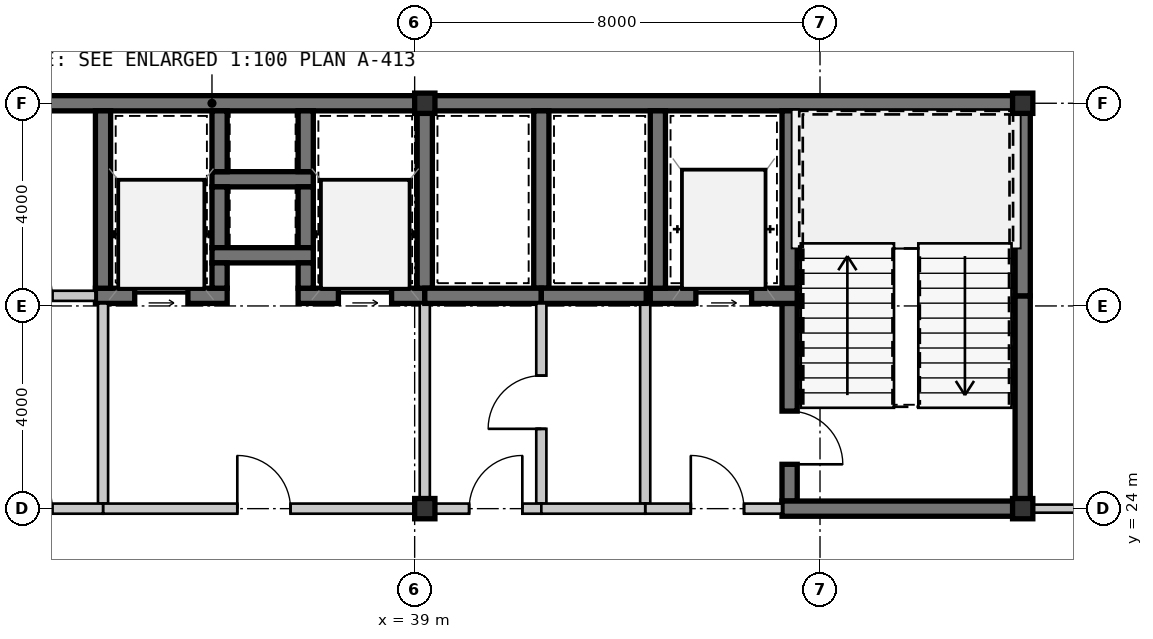
"""IFC4 building model, lengths in metres.
Left out: names, types, materials, properties, quantities, classifications, styles, units other than length and angle.
Written with IfcOpenShell. Run it as: python <this file> out.ifc"""

import sys

from ifc_helpers import new_model, si_unit, direction, frame, frame_2d, origin, origin_2d, place, context, subcontext, project, spatial, rectangle, hollow_rectangle, extrude, source, transform, mapped, element, fill, save


model = new_model("IFC4")
c1 = context("Model", 3, precision=1e-05, world=origin(), true_north=direction((0.0, 1.0)))
c2 = subcontext(c1, "Body", "Model", "MODEL_VIEW")
j1 = project(units=[si_unit("LENGTHUNIT", "METRE"), si_unit("PLANEANGLEUNIT", "RADIAN")], contexts=[c1])
p1 = place(None, origin())
s1 = spatial("IfcSite", under=j1, at=p1, CompositionType="ELEMENT")
p2 = place(p1, origin())
s2 = spatial("IfcBuilding", under=s1, at=p2, CompositionType="ELEMENT")
p3 = place(p2, frame((0.0, 0.0, 158.2)))
s3 = spatial("IfcBuildingStorey", under=s2, at=p3, CompositionType="ELEMENT", Elevation=158.2)
m1 = source(origin(), c2, "Body", "SweptSolid", [
    extrude(hollow_rectangle(XDim=0.4, YDim=0.4, WallThickness=0.016, at=origin_2d()), origin(), (0.0, 0.0, 1.0), 3.15),
])
for number, where, z_axis, x_axis in (
    (1, (39.2, 24.0, 0.0), (0.0, 0.0, 1.0), (1.0, 0.0, 0.0)),
    (2, (51.0, 24.0, 0.0), (0.0, 0.0, 1.0), (1.0, 0.0, 0.0)),
    (3, (39.2, 32.0, 0.0), (0.0, 0.0, 1.0), (1.0, 0.0, 0.0)),
    (4, (51.0, 32.0, 0.0), (0.0, 0.0, 1.0), (1.0, 0.0, 0.0)),
):
    element("IfcColumn", number, at=place(p3, frame(where, z_axis=z_axis, x_axis=x_axis)), inside=s3, PredefinedType="COLUMN", context=c2, shape_type="MappedRepresentation", body=[
        mapped(m1, transform((0.0, 0.0, 0.0), scale=1.0)),
    ])
m2 = source(origin(), c2, "Body", "SweptSolid", [
    extrude(rectangle(XDim=11.2, YDim=0.3, at=frame_2d((5.6, 0.0))), origin(), (0.0, 0.0, 1.0), 2.93),
])
p4 = place(p3, frame((28.0, 32.0, 0.0), z_axis=(0.0, 0.0, 1.0), x_axis=(1.0, 0.0, 0.0)))
e5 = element("IfcWall", 5, at=p4, inside=s3, PredefinedType="SHEAR", context=c2, shape_type="MappedRepresentation", body=[
    mapped(m2, transform((0.0, 0.0, 0.0), scale=1.0)),
])
m3 = source(origin(), c2, "Body", "SweptSolid", [
    extrude(rectangle(XDim=11.95, YDim=0.3, at=frame_2d((5.975, 0.0))), origin(), (0.0, 0.0, 1.0), 2.93),
])
p5 = place(p3, frame((39.2, 32.0, 0.0), z_axis=(0.0, 0.0, 1.0), x_axis=(1.0, 0.0, 0.0)))
e6 = element("IfcWall", 6, at=p5, inside=s3, PredefinedType="SHEAR", context=c2, shape_type="MappedRepresentation", body=[
    mapped(m3, transform((0.0, 0.0, 0.0), scale=1.0)),
])
m4 = source(origin(), c2, "Body", "SweptSolid", [
    extrude(rectangle(XDim=4.05, YDim=0.3, at=frame_2d((2.025, 0.0))), origin(), (0.0, 0.0, 1.0), 2.93),
])
p6 = place(p3, frame((51.0, 24.15, 0.0), z_axis=(0.0, 0.0, 1.0), x_axis=(0.0, 1.0, 0.0)))
e7 = element("IfcWall", 7, at=p6, inside=s3, PredefinedType="SHEAR", context=c2, shape_type="MappedRepresentation", body=[
    mapped(m4, transform((0.0, 0.0, 0.0), scale=1.0)),
])
m5 = source(origin(), c2, "Body", "SweptSolid", [
    extrude(rectangle(XDim=3.65, YDim=0.3, at=frame_2d((1.825, 0.0))), origin(), (0.0, 0.0, 1.0), 2.93),
])
p7 = place(p3, frame((51.0, 28.2, 0.0), z_axis=(0.0, 0.0, 1.0), x_axis=(0.0, 1.0, 0.0)))
e8 = element("IfcWall", 8, at=p7, inside=s3, PredefinedType="SHEAR", context=c2, shape_type="MappedRepresentation", body=[
    mapped(m5, transform((0.0, 0.0, 0.0), scale=1.0)),
])
m6 = source(origin(), c2, "Body", "SweptSolid", [
    extrude(rectangle(XDim=3.5, YDim=0.3, at=frame_2d((1.75, 0.0))), origin(), (0.0, 0.0, 1.0), 2.93),
])
p8 = place(p3, frame((46.4, 31.85, 0.0), z_axis=(0.0, 0.0, 1.0), x_axis=(0.0, -1.0, 0.0)))
e9 = element("IfcWall", 9, at=p8, inside=s3, PredefinedType="SHEAR", context=c2, shape_type="MappedRepresentation", body=[
    mapped(m6, transform((0.0, 0.0, 0.0), scale=1.0)),
])
m7 = source(origin(), c2, "Body", "SweptSolid", [
    extrude(rectangle(XDim=3.9, YDim=0.3, at=frame_2d((1.95, 0.0))), origin(), (0.0, 0.0, 1.0), 2.93),
])
p9 = place(p3, frame((46.4, 28.05, 0.0), z_axis=(0.0, 0.0, 1.0), x_axis=(0.0, -1.0, 0.0)))
e10 = element("IfcWall", 10, at=p9, inside=s3, PredefinedType="SHEAR", context=c2, shape_type="MappedRepresentation", body=[
    mapped(m7, transform((0.0, 0.0, 0.0), scale=1.0)),
])
m8 = source(origin(), c2, "Body", "SweptSolid", [
    extrude(rectangle(XDim=1.05, YDim=2.1, at=frame_2d((0.525, 1.05))), frame((0.0, 0.16, 0.0), z_axis=(0.0, -1.0, 0.0), x_axis=(1.0, 0.0, 0.0)), (0.0, 0.0, 1.0), 0.32),
])
p10 = place(p9, frame((2.125, 0.0, 0.0)))
e11 = element("IfcOpeningElement", 11, at=p10, cuts=e10, PredefinedType="OPENING", context=c2, shape_type="MappedRepresentation", body=[
    mapped(m8, transform((0.0, 0.0, 0.0), scale=1.0)),
])
m9 = source(origin(), c2, "Body", "SweptSolid", [
    extrude(rectangle(XDim=4.9, YDim=0.3, at=frame_2d((2.45, 0.0))), origin(), (0.0, 0.0, 1.0), 2.93),
])
p11 = place(p3, frame((46.25, 24.0, 0.0), z_axis=(0.0, 0.0, 1.0), x_axis=(1.0, 0.0, 0.0)))
e12 = element("IfcWall", 12, at=p11, inside=s3, PredefinedType="SHEAR", context=c2, shape_type="MappedRepresentation", body=[
    mapped(m9, transform((0.0, 0.0, 0.0), scale=1.0)),
])
m10 = source(origin(), c2, "Body", "SweptSolid", [
    extrude(rectangle(XDim=2.9, YDim=0.3, at=frame_2d((1.45, 0.0))), origin(), (0.0, 0.0, 1.0), 2.93),
])
p12 = place(p3, frame((43.65, 28.2, 0.0), z_axis=(0.0, 0.0, 1.0), x_axis=(1.0, 0.0, 0.0)))
e13 = element("IfcWall", 13, at=p12, inside=s3, PredefinedType="SHEAR", context=c2, shape_type="MappedRepresentation", body=[
    mapped(m10, transform((0.0, 0.0, 0.0), scale=1.0)),
])
m11 = source(origin(), c2, "Body", "SweptSolid", [
    extrude(rectangle(XDim=1.1, YDim=2.15, at=frame_2d((0.55, 1.075))), frame((0.0, 0.16, 0.0), z_axis=(0.0, -1.0, 0.0), x_axis=(1.0, 0.0, 0.0)), (0.0, 0.0, 1.0), 0.32),
])
p13 = place(p12, frame((0.9, 0.0, 0.0)))
e14 = element("IfcOpeningElement", 14, at=p13, cuts=e13, PredefinedType="OPENING", context=c2, shape_type="MappedRepresentation", body=[
    mapped(m11, transform((0.0, 0.0, 0.0), scale=1.0)),
])
p14 = place(p3, frame((43.8, 31.85, 0.0), z_axis=(0.0, 0.0, 1.0), x_axis=(0.0, -1.0, 0.0)))
e15 = element("IfcWall", 15, at=p14, inside=s3, PredefinedType="SHEAR", context=c2, shape_type="MappedRepresentation", body=[
    mapped(m6, transform((0.0, 0.0, 0.0), scale=1.0)),
])
m12 = source(origin(), c2, "Body", "SweptSolid", [
    extrude(rectangle(XDim=3.95, YDim=0.2, at=frame_2d((1.975, 0.0))), origin(), (0.0, 0.0, 1.0), 2.93),
])
p15 = place(p3, frame((43.55, 28.05, 0.0), z_axis=(0.0, 0.0, 1.0), x_axis=(0.0, -1.0, 0.0)))
e16 = element("IfcWall", 16, at=p15, inside=s3, PredefinedType="SOLIDWALL", context=c2, shape_type="MappedRepresentation", body=[
    mapped(m12, transform((0.0, 0.0, 0.0), scale=1.0)),
])
m13 = source(origin(), c2, "Body", "SweptSolid", [
    extrude(rectangle(XDim=2.7, YDim=0.2, at=frame_2d((1.35, 0.0))), origin(), (0.0, 0.0, 1.0), 2.397),
])
p16 = place(p3, frame((43.55, 24.0, 0.0), z_axis=(0.0, 0.0, 1.0), x_axis=(1.0, 0.0, 0.0)))
e17 = element("IfcWall", 17, at=p16, inside=s3, PredefinedType="SOLIDWALL", context=c2, shape_type="MappedRepresentation", body=[
    mapped(m13, transform((0.0, 0.0, 0.0), scale=1.0)),
])
m14 = source(origin(), c2, "Body", "SweptSolid", [
    extrude(rectangle(XDim=1.05, YDim=2.1, at=frame_2d((0.525, 1.05))), frame((0.0, 0.11, 0.0), z_axis=(0.0, -1.0, 0.0), x_axis=(1.0, 0.0, 0.0)), (0.0, 0.0, 1.0), 0.22),
])
p17 = place(p16, frame((0.9, 0.0, 0.0)))
e18 = element("IfcOpeningElement", 18, at=p17, cuts=e17, PredefinedType="OPENING", context=c2, shape_type="MappedRepresentation", body=[
    mapped(m14, transform((0.0, 0.0, 0.0), scale=1.0)),
])
m15 = source(origin(), c2, "Body", "SweptSolid", [
    extrude(rectangle(XDim=2.0, YDim=0.3, at=frame_2d((1.0, 0.0))), origin(), (0.0, 0.0, 1.0), 2.93),
])
p18 = place(p3, frame((35.0, 30.5, 0.0), z_axis=(0.0, 0.0, 1.0), x_axis=(1.0, 0.0, 0.0)))
e19 = element("IfcWall", 19, at=p18, inside=s3, PredefinedType="SHEAR", context=c2, shape_type="MappedRepresentation", body=[
    mapped(m15, transform((0.0, 0.0, 0.0), scale=1.0)),
])
m16 = source(origin(), c2, "Body", "SweptSolid", [
    extrude(rectangle(XDim=1.2, YDim=0.3, at=frame_2d((0.6, 0.0))), origin(), (0.0, 0.0, 1.0), 2.93),
])
for number, where, z_axis, x_axis in (
    (20, (35.15, 31.85, 0.0), (0.0, 0.0, 1.0), (0.0, -1.0, 0.0)),
    (21, (36.85, 30.65, 0.0), (0.0, 0.0, 1.0), (0.0, 1.0, 0.0)),
    (22, (35.15, 30.35, 0.0), (0.0, 0.0, 1.0), (0.0, -1.0, 0.0)),
    (23, (36.85, 29.15, 0.0), (0.0, 0.0, 1.0), (0.0, 1.0, 0.0)),
):
    element("IfcWall", number, at=place(p3, frame(where, z_axis=z_axis, x_axis=x_axis)), inside=s3, PredefinedType="SHEAR", context=c2, shape_type="MappedRepresentation", body=[
        mapped(m16, transform((0.0, 0.0, 0.0), scale=1.0)),
    ])
p19 = place(p3, frame((35.0, 29.0, 0.0), z_axis=(0.0, 0.0, 1.0), x_axis=(1.0, 0.0, 0.0)))
e24 = element("IfcWall", 24, at=p19, inside=s3, PredefinedType="SHEAR", context=c2, shape_type="MappedRepresentation", body=[
    mapped(m15, transform((0.0, 0.0, 0.0), scale=1.0)),
])
m17 = source(origin(), c2, "Body", "SweptSolid", [
    extrude(rectangle(XDim=2.6, YDim=0.3, at=frame_2d((1.3, 0.0))), origin(), (0.0, 0.0, 1.0), 2.93),
])
p20 = place(p3, frame((32.7, 28.2, 0.0), z_axis=(0.0, 0.0, 1.0), x_axis=(1.0, 0.0, 0.0)))
e25 = element("IfcWall", 25, at=p20, inside=s3, PredefinedType="SHEAR", context=c2, shape_type="MappedRepresentation", body=[
    mapped(m17, transform((0.0, 0.0, 0.0), scale=1.0)),
])
m18 = source(origin(), c2, "Body", "SweptSolid", [
    extrude(rectangle(XDim=1.05, YDim=2.15, at=frame_2d((0.525, 1.075))), frame((0.0, 0.16, 0.0), z_axis=(0.0, -1.0, 0.0), x_axis=(1.0, 0.0, 0.0)), (0.0, 0.0, 1.0), 0.32),
])
p21 = place(p20, frame((0.775, 0.0, 0.0)))
e26 = element("IfcOpeningElement", 26, at=p21, cuts=e25, PredefinedType="OPENING", context=c2, shape_type="MappedRepresentation", body=[
    mapped(m18, transform((0.0, 0.0, 0.0), scale=1.0)),
])
m19 = source(origin(), c2, "Body", "SweptSolid", [
    extrude(rectangle(XDim=0.5, YDim=0.3, at=frame_2d((0.25, 0.0))), origin(), (0.0, 0.0, 1.0), 2.93),
])
p22 = place(p3, frame((35.15, 28.35, 0.0), z_axis=(0.0, 0.0, 1.0), x_axis=(0.0, 1.0, 0.0)))
e27 = element("IfcWall", 27, at=p22, inside=s3, PredefinedType="SHEAR", context=c2, shape_type="MappedRepresentation", body=[
    mapped(m19, transform((0.0, 0.0, 0.0), scale=1.0)),
])
p23 = place(p3, frame((32.85, 31.85, 0.0), z_axis=(0.0, 0.0, 1.0), x_axis=(0.0, -1.0, 0.0)))
e28 = element("IfcWall", 28, at=p23, inside=s3, PredefinedType="SHEAR", context=c2, shape_type="MappedRepresentation", body=[
    mapped(m6, transform((0.0, 0.0, 0.0), scale=1.0)),
])
m20 = source(origin(), c2, "Body", "SweptSolid", [
    extrude(rectangle(XDim=2.5, YDim=0.3, at=frame_2d((1.25, 0.0))), origin(), (0.0, 0.0, 1.0), 2.93),
])
p24 = place(p3, frame((36.7, 28.2, 0.0), z_axis=(0.0, 0.0, 1.0), x_axis=(1.0, 0.0, 0.0)))
e29 = element("IfcWall", 29, at=p24, inside=s3, PredefinedType="SHEAR", context=c2, shape_type="MappedRepresentation", body=[
    mapped(m20, transform((0.0, 0.0, 0.0), scale=1.0)),
])
p25 = place(p24, frame((0.795, 0.0, 0.0)))
e30 = element("IfcOpeningElement", 30, at=p25, cuts=e29, PredefinedType="OPENING", context=c2, shape_type="MappedRepresentation", body=[
    mapped(m18, transform((0.0, 0.0, 0.0), scale=1.0)),
])
p26 = place(p3, frame((36.85, 28.85, 0.0), z_axis=(0.0, 0.0, 1.0), x_axis=(0.0, -1.0, 0.0)))
e31 = element("IfcWall", 31, at=p26, inside=s3, PredefinedType="SHEAR", context=c2, shape_type="MappedRepresentation", body=[
    mapped(m19, transform((0.0, 0.0, 0.0), scale=1.0)),
])
p27 = place(p3, frame((39.2, 28.35, 0.0), z_axis=(0.0, 0.0, 1.0), x_axis=(0.0, 1.0, 0.0)))
e32 = element("IfcWall", 32, at=p27, inside=s3, PredefinedType="SHEAR", context=c2, shape_type="MappedRepresentation", body=[
    mapped(m6, transform((0.0, 0.0, 0.0), scale=1.0)),
])
p28 = place(p3, frame((32.85, 24.1, 0.0), z_axis=(0.0, 0.0, 1.0), x_axis=(0.0, 1.0, 0.0)))
e33 = element("IfcWall", 33, at=p28, inside=s3, PredefinedType="SOLIDWALL", context=c2, shape_type="MappedRepresentation", body=[
    mapped(m12, transform((0.0, 0.0, 0.0), scale=1.0)),
])
m21 = source(origin(), c2, "Body", "SweptSolid", [
    extrude(rectangle(XDim=3.95, YDim=0.2, at=frame_2d((1.975, 0.0))), origin(), (0.0, 0.0, 1.0), 2.47),
])
p29 = place(p3, frame((39.2, 28.05, 0.0), z_axis=(0.0, 0.0, 1.0), x_axis=(0.0, -1.0, 0.0)))
e34 = element("IfcWall", 34, at=p29, inside=s3, PredefinedType="SOLIDWALL", context=c2, shape_type="MappedRepresentation", body=[
    mapped(m21, transform((0.0, 0.0, 0.0), scale=1.0)),
])
m22 = source(origin(), c2, "Body", "SweptSolid", [
    extrude(rectangle(XDim=6.35, YDim=0.2, at=frame_2d((3.175, 0.0))), origin(), (0.0, 0.0, 1.0), 2.47),
])
p30 = place(p3, frame((39.2, 24.0, 0.0), z_axis=(0.0, 0.0, 1.0), x_axis=(-1.0, 0.0, 0.0)))
e35 = element("IfcWall", 35, at=p30, inside=s3, PredefinedType="SOLIDWALL", context=c2, shape_type="MappedRepresentation", body=[
    mapped(m22, transform((0.0, 0.0, 0.0), scale=1.0)),
])
p31 = place(p30, frame((2.65, 0.0, 0.0)))
e36 = element("IfcOpeningElement", 36, at=p31, cuts=e35, PredefinedType="OPENING", context=c2, shape_type="MappedRepresentation", body=[
    mapped(m14, transform((0.0, 0.0, 0.0), scale=1.0)),
])
p32 = place(p3, frame((41.5, 28.35, 0.0), z_axis=(0.0, 0.0, 1.0), x_axis=(0.0, 1.0, 0.0)))
e37 = element("IfcWall", 37, at=p32, inside=s3, PredefinedType="SHEAR", context=c2, shape_type="MappedRepresentation", body=[
    mapped(m6, transform((0.0, 0.0, 0.0), scale=1.0)),
])
m23 = source(origin(), c2, "Body", "SweptSolid", [
    extrude(rectangle(XDim=2.3, YDim=0.3, at=frame_2d((1.15, 0.0))), origin(), (0.0, 0.0, 1.0), 2.93),
])
p33 = place(p3, frame((39.2, 28.2, 0.0), z_axis=(0.0, 0.0, 1.0), x_axis=(1.0, 0.0, 0.0)))
e38 = element("IfcWall", 38, at=p33, inside=s3, PredefinedType="SHEAR", context=c2, shape_type="MappedRepresentation", body=[
    mapped(m23, transform((0.0, 0.0, 0.0), scale=1.0)),
])
m24 = source(origin(), c2, "Body", "SweptSolid", [
    extrude(rectangle(XDim=2.07, YDim=0.3, at=frame_2d((1.035, 0.0))), origin(), (0.0, 0.0, 1.0), 2.93),
])
p34 = place(p3, frame((41.5, 28.2, 0.0), z_axis=(0.0, 0.0, 1.0), x_axis=(1.0, 0.0, 0.0)))
e39 = element("IfcWall", 39, at=p34, inside=s3, PredefinedType="SHEAR", context=c2, shape_type="MappedRepresentation", body=[
    mapped(m24, transform((0.0, 0.0, 0.0), scale=1.0)),
])
m25 = source(origin(), c2, "Body", "SweptSolid", [
    extrude(rectangle(XDim=2.9, YDim=0.2, at=frame_2d((1.45, 0.0))), origin(), (0.0, 0.0, 1.0), 2.93),
])
p35 = place(p3, frame((29.8, 28.2, 0.0), z_axis=(0.0, 0.0, 1.0), x_axis=(1.0, 0.0, 0.0)))
e40 = element("IfcWall", 40, at=p35, inside=s3, PredefinedType="SOLIDWALL", context=c2, shape_type="MappedRepresentation", body=[
    mapped(m25, transform((0.0, 0.0, 0.0), scale=1.0)),
])
p36 = place(p35, frame((1.0, 0.0, 0.0)))
e41 = element("IfcOpeningElement", 41, at=p36, cuts=e40, PredefinedType="OPENING", context=c2, shape_type="MappedRepresentation", body=[
    mapped(m14, transform((0.0, 0.0, 0.0), scale=1.0)),
])
m26 = source(origin(), c2, "Body", "SweptSolid", [
    extrude(rectangle(XDim=3.05, YDim=0.2, at=frame_2d((1.525, 0.0))), origin(), (0.0, 0.0, 1.0), 2.47),
])
p37 = place(p3, frame((32.85, 24.0, 0.0), z_axis=(0.0, 0.0, 1.0), x_axis=(-1.0, 0.0, 0.0)))
e42 = element("IfcWall", 42, at=p37, inside=s3, PredefinedType="SOLIDWALL", context=c2, shape_type="MappedRepresentation", body=[
    mapped(m26, transform((0.0, 0.0, 0.0), scale=1.0)),
])
p38 = place(p37, frame((1.0, 0.0, 0.0)))
e43 = element("IfcOpeningElement", 43, at=p38, cuts=e42, PredefinedType="OPENING", context=c2, shape_type="MappedRepresentation", body=[
    mapped(m14, transform((0.0, 0.0, 0.0), scale=1.0)),
])
p39 = place(p3, frame((41.5, 28.05, 0.0), z_axis=(0.0, 0.0, 1.0), x_axis=(0.0, -1.0, 0.0)))
e44 = element("IfcWall", 44, at=p39, inside=s3, PredefinedType="SOLIDWALL", context=c2, shape_type="MappedRepresentation", body=[
    mapped(m12, transform((0.0, 0.0, 0.0), scale=1.0)),
])
p40 = place(p39, frame((1.425, 0.0, 0.0)))
e45 = element("IfcOpeningElement", 45, at=p40, cuts=e44, PredefinedType="OPENING", context=c2, shape_type="MappedRepresentation", body=[
    mapped(m14, transform((0.0, 0.0, 0.0), scale=1.0)),
])
m27 = source(origin(), c2, "Body", "SweptSolid", [
    extrude(rectangle(XDim=2.3, YDim=0.2, at=frame_2d((1.15, 0.0))), origin(), (0.0, 0.0, 1.0), 2.397),
])
p41 = place(p3, frame((41.5, 24.0, 0.0), z_axis=(0.0, 0.0, 1.0), x_axis=(-1.0, 0.0, 0.0)))
e46 = element("IfcWall", 46, at=p41, inside=s3, PredefinedType="SOLIDWALL", context=c2, shape_type="MappedRepresentation", body=[
    mapped(m27, transform((0.0, 0.0, 0.0), scale=1.0)),
])
p42 = place(p41, frame((0.375, 0.0, 0.0)))
e47 = element("IfcOpeningElement", 47, at=p42, cuts=e46, PredefinedType="OPENING", context=c2, shape_type="MappedRepresentation", body=[
    mapped(m14, transform((0.0, 0.0, 0.0), scale=1.0)),
])
m28 = source(origin(), c2, "Body", "SweptSolid", [
    extrude(rectangle(XDim=2.05, YDim=0.2, at=frame_2d((1.025, 0.0))), origin(), (0.0, 0.0, 1.0), 2.397),
])
p43 = place(p3, frame((43.55, 24.0, 0.0), z_axis=(0.0, 0.0, 1.0), x_axis=(-1.0, 0.0, 0.0)))
e48 = element("IfcWall", 48, at=p43, inside=s3, PredefinedType="SOLIDWALL", context=c2, shape_type="MappedRepresentation", body=[
    mapped(m28, transform((0.0, 0.0, 0.0), scale=1.0)),
])
m29 = source(origin(), c2, "Body", "SweptSolid", [
    extrude(rectangle(XDim=10.1, YDim=0.16, at=frame_2d((5.05, 0.0))), origin(), (0.0, 0.0, 1.0), 2.93),
])
p44 = place(p3, frame((51.15, 24.0, 0.0), z_axis=(0.0, 0.0, 1.0), x_axis=(1.0, 0.0, 0.0)))
e49 = element("IfcWall", 49, at=p44, inside=s3, PredefinedType="PARTITIONING", context=c2, shape_type="MappedRepresentation", body=[
    mapped(m29, transform((0.0, 0.0, 0.0), scale=1.0)),
])
m30 = source(origin(), c2, "Body", "SweptSolid", [
    extrude(rectangle(XDim=0.92, YDim=2.1, at=frame_2d((0.46, 1.05))), frame((0.0, 0.09, 0.0), z_axis=(0.0, -1.0, 0.0), x_axis=(1.0, 0.0, 0.0)), (0.0, 0.0, 1.0), 0.18),
])
p45 = place(p44, frame((4.525, 0.0, 0.0)))
e50 = element("IfcOpeningElement", 50, at=p45, cuts=e49, PredefinedType="OPENING", context=c2, shape_type="MappedRepresentation", body=[
    mapped(m30, transform((0.0, 0.0, 0.0), scale=1.0)),
])
m31 = source(origin(), c2, "Body", "SweptSolid", [
    extrude(rectangle(XDim=1.05, YDim=2.1, at=frame_2d((0.525, 1.05))), frame((0.0, 0.025, 0.0), z_axis=(0.0, -1.0, 0.0), x_axis=(1.0, 0.0, 0.0)), (0.0, 0.0, 1.0), 0.05),
])
p46 = place(p10, origin())
e51 = element("IfcDoor", 51, at=p46, inside=s3, OperationType="SINGLE_SWING_RIGHT", PredefinedType="DOOR", context=c2, shape_type="MappedRepresentation", body=[
    mapped(m31, transform((0.0, 0.0, 0.0), scale=1.0)),
])
fill(e11, e51)
m32 = source(origin(), c2, "Body", "SweptSolid", [
    extrude(rectangle(XDim=1.1, YDim=2.15, at=frame_2d((0.55, 1.075))), frame((0.0, 0.025, 0.0), z_axis=(0.0, -1.0, 0.0), x_axis=(1.0, 0.0, 0.0)), (0.0, 0.0, 1.0), 0.05),
])
p47 = place(p13, origin())
e52 = element("IfcDoor", 52, at=p47, inside=s3, OperationType="SLIDING_TO_LEFT", PredefinedType="DOOR", context=c2, shape_type="MappedRepresentation", body=[
    mapped(m32, transform((0.0, 0.0, 0.0), scale=1.0)),
])
fill(e14, e52)
p48 = place(p17, origin())
e53 = element("IfcDoor", 53, at=p48, inside=s3, OperationType="SINGLE_SWING_LEFT", PredefinedType="DOOR", context=c2, shape_type="MappedRepresentation", body=[
    mapped(m31, transform((0.0, 0.0, 0.0), scale=1.0)),
])
fill(e18, e53)
m33 = source(origin(), c2, "Body", "SweptSolid", [
    extrude(rectangle(XDim=1.05, YDim=2.15, at=frame_2d((0.525, 1.075))), frame((0.0, 0.025, 0.0), z_axis=(0.0, -1.0, 0.0), x_axis=(1.0, 0.0, 0.0)), (0.0, 0.0, 1.0), 0.05),
])
p49 = place(p21, origin())
e54 = element("IfcDoor", 54, at=p49, inside=s3, OperationType="SLIDING_TO_LEFT", PredefinedType="DOOR", context=c2, shape_type="MappedRepresentation", body=[
    mapped(m33, transform((0.0, 0.0, 0.0), scale=1.0)),
])
fill(e26, e54)
p50 = place(p25, origin())
e55 = element("IfcDoor", 55, at=p50, inside=s3, OperationType="SLIDING_TO_LEFT", PredefinedType="DOOR", context=c2, shape_type="MappedRepresentation", body=[
    mapped(m33, transform((0.0, 0.0, 0.0), scale=1.0)),
])
fill(e30, e55)
p51 = place(p31, frame((1.05, 0.0, 0.0), z_axis=(0.0, 0.0, 1.0), x_axis=(-1.0, 0.0, 0.0)))
e56 = element("IfcDoor", 56, at=p51, inside=s3, OperationType="SINGLE_SWING_LEFT", PredefinedType="DOOR", context=c2, shape_type="MappedRepresentation", body=[
    mapped(m31, transform((0.0, 0.0, 0.0), scale=1.0)),
])
fill(e36, e56)
p52 = place(p40, frame((1.05, 0.0, 0.0), z_axis=(0.0, 0.0, 1.0), x_axis=(-1.0, 0.0, 0.0)))
e57 = element("IfcDoor", 57, at=p52, inside=s3, OperationType="SINGLE_SWING_LEFT", PredefinedType="DOOR", context=c2, shape_type="MappedRepresentation", body=[
    mapped(m31, transform((0.0, 0.0, 0.0), scale=1.0)),
])
fill(e45, e57)
p53 = place(p42, frame((1.05, 0.0, 0.0), z_axis=(0.0, 0.0, 1.0), x_axis=(-1.0, 0.0, 0.0)))
e58 = element("IfcDoor", 58, at=p53, inside=s3, OperationType="SINGLE_SWING_RIGHT", PredefinedType="DOOR", context=c2, shape_type="MappedRepresentation", body=[
    mapped(m31, transform((0.0, 0.0, 0.0), scale=1.0)),
])
fill(e47, e58)
save(model, sys.argv[1])
